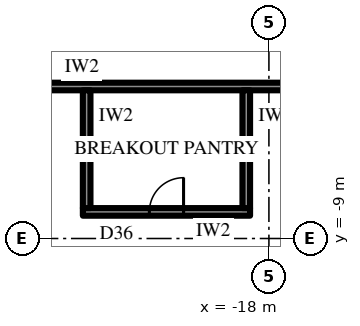
"""IFC4 building model, lengths in metres.
Left out: names, types, materials, properties, quantities, classifications, styles, units other than length and angle.
Written with IfcOpenShell. Run it as: python <this file> out.ifc"""

import sys

from ifc_helpers import new_model, si_unit, direction, frame, frame_2d, origin, place, context, subcontext, project, spatial, rectangle, extrude, element, fill, save


model = new_model("IFC4")
c1 = context("Model", 3, precision=1e-05, world=origin(), true_north=direction((0.0, 1.0)))
c2 = subcontext(c1, "Body", "Model", "MODEL_VIEW")
j1 = project(units=[si_unit("LENGTHUNIT", "METRE"), si_unit("PLANEANGLEUNIT", "RADIAN")], contexts=[c1])
p1 = place(None, origin())
s1 = spatial("IfcSite", under=j1, at=p1, CompositionType="ELEMENT")
p2 = place(p1, origin())
s2 = spatial("IfcBuilding", under=s1, at=p2, CompositionType="ELEMENT")
p3 = place(p2, frame((0.0, 0.0, 286.9)))
s3 = spatial("IfcBuildingStorey", under=s2, at=p3, CompositionType="ELEMENT", Elevation=286.9)
p4 = place(p3, frame((-31.263, -3.551, 0.0), z_axis=(0.0, 0.0, 1.0), x_axis=(0.500000442367, -0.866025148383, 0.0)))
e1 = element("IfcWall", 1, at=p4, inside=s3, PredefinedType="SOLIDWALL", context=c2, shape_type="SweptSolid", body=[
    extrude(rectangle(XDim=25.113, YDim=0.3, at=frame_2d((12.556, 0.0))), origin(), (0.0, 0.0, 1.0), 2.8),
])
p5 = place(p4, frame((4.278, 0.0, 0.6)))
e2 = element("IfcOpeningElement", 2, at=p5, cuts=e1, PredefinedType="OPENING", context=c2, shape_type="SweptSolid", body=[
    extrude(rectangle(XDim=2.7, YDim=1.95, at=frame_2d((1.35, 0.975))), frame((0.0, 0.16, 0.0), z_axis=(0.0, -1.0, 0.0), x_axis=(1.0, 0.0, 0.0)), (0.0, 0.0, 1.0), 0.32),
])
p6 = place(p4, frame((9.647, 0.0, 0.0)))
e3 = element("IfcOpeningElement", 3, at=p6, cuts=e1, PredefinedType="OPENING", context=c2, shape_type="SweptSolid", body=[
    extrude(rectangle(XDim=1.2, YDim=2.4, at=frame_2d((0.6, 1.2))), frame((0.0, 0.16, 0.0), z_axis=(0.0, -1.0, 0.0), x_axis=(1.0, 0.0, 0.0)), (0.0, 0.0, 1.0), 0.32),
])
p7 = place(p4, frame((13.516, 0.0, 0.6)))
e4 = element("IfcOpeningElement", 4, at=p7, cuts=e1, PredefinedType="OPENING", context=c2, shape_type="SweptSolid", body=[
    extrude(rectangle(XDim=2.7, YDim=1.95, at=frame_2d((1.35, 0.975))), frame((0.0, 0.16, 0.0), z_axis=(0.0, -1.0, 0.0), x_axis=(1.0, 0.0, 0.0)), (0.0, 0.0, 1.0), 0.32),
])
p8 = place(p4, frame((18.135, 0.0, 0.6)))
e5 = element("IfcOpeningElement", 5, at=p8, cuts=e1, PredefinedType="OPENING", context=c2, shape_type="SweptSolid", body=[
    extrude(rectangle(XDim=2.7, YDim=1.95, at=frame_2d((1.35, 0.975))), frame((0.0, 0.16, 0.0), z_axis=(0.0, -1.0, 0.0), x_axis=(1.0, 0.0, 0.0)), (0.0, 0.0, 1.0), 0.32),
])
p9 = place(p3, frame((-15.5, -5.0, 0.0), z_axis=(0.0, 0.0, 1.0), x_axis=(-1.0, 0.0, 0.0)))
e6 = element("IfcWall", 6, at=p9, inside=s3, PredefinedType="PARTITIONING", context=c2, shape_type="SweptSolid", body=[
    extrude(rectangle(XDim=14.845, YDim=0.2, at=frame_2d((7.423, 0.0))), origin(), (0.0, 0.0, 1.0), 4.0),
])
p10 = place(p9, frame((0.985, 0.0, 0.0)))
e7 = element("IfcOpeningElement", 7, at=p10, cuts=e6, PredefinedType="OPENING", context=c2, shape_type="SweptSolid", body=[
    extrude(rectangle(XDim=1.0, YDim=2.2, at=frame_2d((0.5, 1.1))), frame((0.0, 0.11, 0.0), z_axis=(0.0, -1.0, 0.0), x_axis=(1.0, 0.0, 0.0)), (0.0, 0.0, 1.0), 0.22),
])
p11 = place(p3, frame((-18.496, -8.3, 0.0), z_axis=(0.0, 0.0, 1.0), x_axis=(-1.0, 0.0, 0.0)))
e8 = element("IfcWall", 8, at=p11, inside=s3, PredefinedType="PARTITIONING", context=c2, shape_type="SweptSolid", body=[
    extrude(rectangle(XDim=4.4, YDim=0.2, at=frame_2d((2.2, 0.0))), origin(), (0.0, 0.0, 1.0), 4.0),
])
p12 = place(p11, frame((1.75, 0.0, 0.0)))
e9 = element("IfcOpeningElement", 9, at=p12, cuts=e8, PredefinedType="OPENING", context=c2, shape_type="SweptSolid", body=[
    extrude(rectangle(XDim=0.9, YDim=2.2, at=frame_2d((0.45, 1.1))), frame((0.0, 0.11, 0.0), z_axis=(0.0, -1.0, 0.0), x_axis=(1.0, 0.0, 0.0)), (0.0, 0.0, 1.0), 0.22),
])
for number, where, z_axis, x_axis in (
    (10, (-18.596, -5.1, 0.0), (0.0, 0.0, 1.0), (0.0, -1.0, 0.0)),
    (11, (-22.796, -5.1, 0.0), (0.0, 0.0, 1.0), (0.0, -1.0, 0.0)),
):
    element("IfcWall", number, at=place(p3, frame(where, z_axis=z_axis, x_axis=x_axis)), inside=s3, PredefinedType="PARTITIONING", context=c2, shape_type="SweptSolid", body=[
        extrude(rectangle(XDim=3.1, YDim=0.2, at=frame_2d((1.55, 0.0))), origin(), (0.0, 0.0, 1.0), 4.0),
    ])
p13 = place(p12, frame((0.9, 0.0, 0.0), z_axis=(0.0, 0.0, 1.0), x_axis=(-1.0, 0.0, 0.0)))
e12 = element("IfcDoor", 12, at=p13, inside=s3, OperationType="SINGLE_SWING_LEFT", PredefinedType="DOOR", context=c2, shape_type="SweptSolid", body=[
    extrude(rectangle(XDim=0.9, YDim=2.2, at=frame_2d((0.45, 1.1))), frame((0.0, 0.025, 0.0), z_axis=(0.0, -1.0, 0.0), x_axis=(1.0, 0.0, 0.0)), (0.0, 0.0, 1.0), 0.05),
])
fill(e9, e12)
save(model, sys.argv[1])
